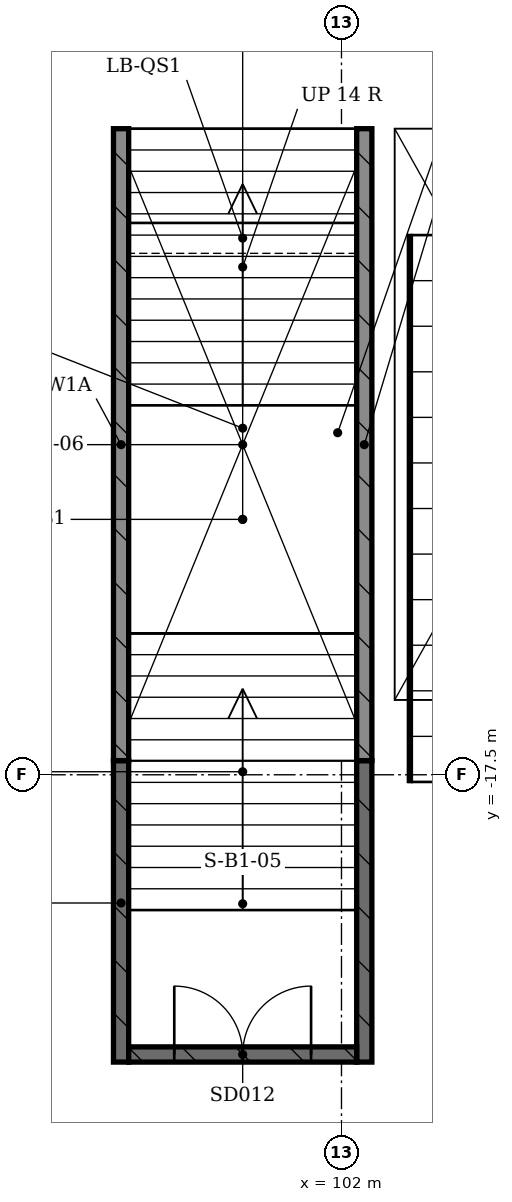
"""IFC4 building model, lengths in metres.
Left out: names, types, materials, properties, quantities, classifications, styles, units other than length and angle.
Written with IfcOpenShell. Run it as: python <this file> out.ifc"""

import sys

from ifc_helpers import new_model, si_unit, direction, frame, frame_2d, origin, place, context, subcontext, project, spatial, rectangle, extrude, element, fill, save


model = new_model("IFC4")
c1 = context("Model", 3, precision=1e-05, world=origin(), true_north=direction((0.0, 1.0)))
c2 = subcontext(c1, "Body", "Model", "MODEL_VIEW")
j1 = project(units=[si_unit("LENGTHUNIT", "METRE"), si_unit("PLANEANGLEUNIT", "RADIAN")], contexts=[c1])
p1 = place(None, origin())
s1 = spatial("IfcSite", under=j1, at=p1, CompositionType="ELEMENT")
p2 = place(p1, origin())
s2 = spatial("IfcBuilding", under=s1, at=p2, CompositionType="ELEMENT")
p3 = place(p2, frame((0.0, 0.0, -4.5)))
s3 = spatial("IfcBuildingStorey", under=s2, at=p3, CompositionType="ELEMENT", Elevation=-4.5)
for number, where, z_axis, x_axis in (
    (1, (99.1, -21.28, 0.0), (0.0, 0.0, 1.0), (0.0, 1.0, 0.0)),
    (2, (102.3, -21.28, 0.0), (0.0, 0.0, 1.0), (0.0, 1.0, 0.0)),
):
    element("IfcWall", number, at=place(p3, frame(where, z_axis=z_axis, x_axis=x_axis)), inside=s3, PredefinedType="SHEAR", context=c2, shape_type="SweptSolid", body=[
        extrude(rectangle(XDim=3.966, YDim=0.2, at=frame_2d((1.983, 0.0))), origin(), (0.0, 0.0, 1.0), 3.5),
    ])
p4 = place(p3, frame((99.2, -21.18, 0.0), z_axis=(0.0, 0.0, 1.0), x_axis=(1.0, 0.0, 0.0)))
e3 = element("IfcWall", 3, at=p4, inside=s3, PredefinedType="SHEAR", context=c2, shape_type="SweptSolid", body=[
    extrude(rectangle(XDim=3.0, YDim=0.2, at=frame_2d((1.5, 0.0))), origin(), (0.0, 0.0, 1.0), 3.5),
])
p5 = place(p4, frame((0.6, 0.0, 0.0)))
e4 = element("IfcOpeningElement", 4, at=p5, cuts=e3, PredefinedType="OPENING", context=c2, shape_type="SweptSolid", body=[
    extrude(rectangle(XDim=1.8, YDim=2.1, at=frame_2d((0.9, 1.05))), frame((0.0, 0.1, 0.0), z_axis=(0.0, -1.0, 0.0), x_axis=(1.0, 0.0, 0.0)), (0.0, 0.0, 1.0), 0.2),
])
for number, where, z_axis, x_axis in (
    (5, (99.1, -17.314, 0.0), (0.0, 0.0, 1.0), (0.0, 1.0, 0.0)),
    (6, (102.3, -17.314, 0.0), (0.0, 0.0, 1.0), (0.0, 1.0, 0.0)),
):
    element("IfcWall", number, at=place(p3, frame(where, z_axis=z_axis, x_axis=x_axis)), inside=s3, PredefinedType="SHEAR", context=c2, shape_type="SweptSolid", body=[
        extrude(rectangle(XDim=8.314, YDim=0.2, at=frame_2d((4.157, 0.0))), origin(), (0.0, 0.0, 1.0), 5.6),
    ])
p6 = place(p5, origin())
e7 = element("IfcDoor", 7, at=p6, inside=s3, OperationType="DOUBLE_DOOR_SINGLE_SWING", PredefinedType="DOOR", context=c2, shape_type="SweptSolid", body=[
    extrude(rectangle(XDim=1.8, YDim=2.1, at=frame_2d((0.9, 1.05))), frame((0.0, 0.025, 0.0), z_axis=(0.0, -1.0, 0.0), x_axis=(1.0, 0.0, 0.0)), (0.0, 0.0, 1.0), 0.05),
])
fill(e4, e7)
save(model, sys.argv[1])
